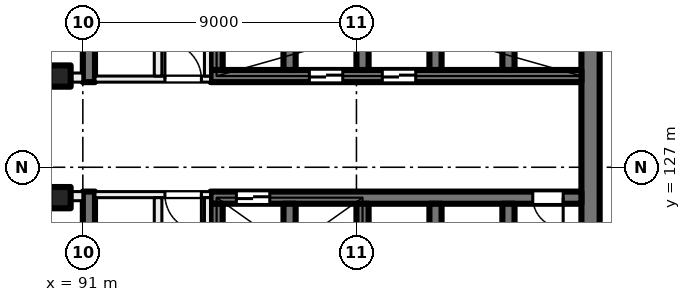
"""IFC4 building model, lengths in metres.
Left out: names, types, materials, properties, quantities, classifications, styles, units other than length and angle.
Written with IfcOpenShell. Run it as: python <this file> out.ifc"""

import sys

from ifc_helpers import new_model, si_unit, direction, frame, frame_2d, origin, origin_2d, place, context, subcontext, project, spatial, rectangle, extrude, element, fill, save


model = new_model("IFC4")
c1 = context("Model", 3, precision=1e-05, world=origin(), true_north=direction((0.0, 1.0)))
c2 = subcontext(c1, "Body", "Model", "MODEL_VIEW")
j1 = project(units=[si_unit("LENGTHUNIT", "METRE"), si_unit("PLANEANGLEUNIT", "RADIAN")], contexts=[c1])
p1 = place(None, origin())
s1 = spatial("IfcSite", under=j1, at=p1, CompositionType="ELEMENT")
p2 = place(p1, origin())
s2 = spatial("IfcBuilding", under=s1, at=p2, CompositionType="ELEMENT")
p3 = place(p2, frame((0.0, 0.0, 47.5)))
s3 = spatial("IfcBuildingStorey", under=s2, at=p3, CompositionType="ELEMENT", Elevation=47.5)
for number, where, z_axis, x_axis in (
    (1, (90.25, 130.0, 0.0), (0.0, 0.0, 1.0), (1.0, 0.0, 0.0)),
    (2, (90.25, 126.0, 0.0), (0.0, 0.0, 1.0), (1.0, 0.0, 0.0)),
):
    element("IfcColumn", number, at=place(p3, frame(where, z_axis=z_axis, x_axis=x_axis)), inside=s3, PredefinedType="COLUMN", context=c2, shape_type="SweptSolid", body=[
        extrude(rectangle(XDim=0.7, YDim=0.7, at=origin_2d()), origin(), (0.0, 0.0, 1.0), 4.0),
    ])
p4 = place(p3, frame((107.7, 135.2, 0.0), z_axis=(0.0, 0.0, 1.0), x_axis=(0.0, -1.0, 0.0)))
e3 = element("IfcWall", 3, at=p4, inside=s3, PredefinedType="SHEAR", context=c2, shape_type="SweptSolid", body=[
    extrude(rectangle(XDim=14.4, YDim=0.6, at=frame_2d((7.2, 0.0))), origin(), (0.0, 0.0, 1.0), 4.0),
])
p5 = place(p3, frame((107.4, 130.0, 0.0), z_axis=(0.0, 0.0, 1.0), x_axis=(-1.0, 0.0, 0.0)))
e4 = element("IfcWall", 4, at=p5, inside=s3, PredefinedType="SHEAR", context=c2, shape_type="SweptSolid", body=[
    extrude(rectangle(XDim=12.2, YDim=0.4, at=frame_2d((6.1, 0.0))), origin(), (0.0, 0.0, 1.0), 4.0),
])
p6 = place(p5, frame((5.45, 0.0, 0.0)))
e5 = element("IfcOpeningElement", 5, at=p6, cuts=e4, PredefinedType="OPENING", context=c2, shape_type="SweptSolid", body=[
    extrude(rectangle(XDim=1.1, YDim=2.1, at=frame_2d((0.55, 1.05))), frame((0.0, 0.21, 0.0), z_axis=(0.0, -1.0, 0.0), x_axis=(1.0, 0.0, 0.0)), (0.0, 0.0, 1.0), 0.42),
])
p7 = place(p5, frame((7.85, 0.0, 0.0)))
e6 = element("IfcOpeningElement", 6, at=p7, cuts=e4, PredefinedType="OPENING", context=c2, shape_type="SweptSolid", body=[
    extrude(rectangle(XDim=1.1, YDim=2.1, at=frame_2d((0.55, 1.05))), frame((0.0, 0.21, 0.0), z_axis=(0.0, -1.0, 0.0), x_axis=(1.0, 0.0, 0.0)), (0.0, 0.0, 1.0), 0.42),
])
for number, where, z_axis, x_axis in (
    (7, (105.0, 133.2, 0.0), (0.0, 0.0, 1.0), (0.0, -1.0, 0.0)),
    (8, (102.6, 133.2, 0.0), (0.0, 0.0, 1.0), (0.0, -1.0, 0.0)),
    (9, (100.2, 133.2, 0.0), (0.0, 0.0, 1.0), (0.0, -1.0, 0.0)),
    (10, (97.8, 133.2, 0.0), (0.0, 0.0, 1.0), (0.0, -1.0, 0.0)),
    (11, (95.4, 133.2, 0.0), (0.0, 0.0, 1.0), (0.0, -1.0, 0.0)),
):
    element("IfcWall", number, at=place(p3, frame(where, z_axis=z_axis, x_axis=x_axis)), inside=s3, PredefinedType="SHEAR", context=c2, shape_type="SweptSolid", body=[
        extrude(rectangle(XDim=3.0, YDim=0.4, at=frame_2d((1.5, 0.0))), origin(), (0.0, 0.0, 1.0), 4.0),
    ])
p8 = place(p3, frame((107.4, 126.0, 0.0), z_axis=(0.0, 0.0, 1.0), x_axis=(-1.0, 0.0, 0.0)))
e12 = element("IfcWall", 12, at=p8, inside=s3, PredefinedType="SHEAR", context=c2, shape_type="SweptSolid", body=[
    extrude(rectangle(XDim=12.2, YDim=0.4, at=frame_2d((6.1, 0.0))), origin(), (0.0, 0.0, 1.0), 4.0),
])
p9 = place(p8, frame((10.25, 0.0, 0.0)))
e13 = element("IfcOpeningElement", 13, at=p9, cuts=e12, PredefinedType="OPENING", context=c2, shape_type="SweptSolid", body=[
    extrude(rectangle(XDim=1.1, YDim=2.1, at=frame_2d((0.55, 1.05))), frame((0.0, 0.21, 0.0), z_axis=(0.0, -1.0, 0.0), x_axis=(1.0, 0.0, 0.0)), (0.0, 0.0, 1.0), 0.42),
])
p10 = place(p8, frame((0.6, 0.0, 0.0)))
e14 = element("IfcOpeningElement", 14, at=p10, cuts=e12, PredefinedType="OPENING", context=c2, shape_type="SweptSolid", body=[
    extrude(rectangle(XDim=1.0, YDim=2.1, at=frame_2d((0.5, 1.05))), frame((0.0, 0.21, 0.0), z_axis=(0.0, -1.0, 0.0), x_axis=(1.0, 0.0, 0.0)), (0.0, 0.0, 1.0), 0.42),
])
for number, where, z_axis, x_axis in (
    (15, (105.0, 125.8, 0.0), (0.0, 0.0, 1.0), (0.0, -1.0, 0.0)),
    (16, (102.6, 125.8, 0.0), (0.0, 0.0, 1.0), (0.0, -1.0, 0.0)),
    (17, (100.2, 125.8, 0.0), (0.0, 0.0, 1.0), (0.0, -1.0, 0.0)),
    (18, (97.8, 125.8, 0.0), (0.0, 0.0, 1.0), (0.0, -1.0, 0.0)),
    (19, (95.4, 125.8, 0.0), (0.0, 0.0, 1.0), (0.0, -1.0, 0.0)),
):
    element("IfcWall", number, at=place(p3, frame(where, z_axis=z_axis, x_axis=x_axis)), inside=s3, PredefinedType="SHEAR", context=c2, shape_type="SweptSolid", body=[
        extrude(rectangle(XDim=3.0, YDim=0.4, at=frame_2d((1.5, 0.0))), origin(), (0.0, 0.0, 1.0), 4.0),
    ])
for number, where, z_axis, x_axis in (
    (20, (91.2, 138.4, 0.0), (0.0, 0.0, 1.0), (0.0, -1.0, 0.0)),
    (21, (91.2, 126.2, 0.0), (0.0, 0.0, 1.0), (0.0, -1.0, 0.0)),
):
    element("IfcWall", number, at=place(p3, frame(where, z_axis=z_axis, x_axis=x_axis)), inside=s3, PredefinedType="SHEAR", context=c2, shape_type="SweptSolid", body=[
        extrude(rectangle(XDim=8.6, YDim=0.4, at=frame_2d((4.3, 0.0))), origin(), (0.0, 0.0, 1.0), 4.0),
    ])
p11 = place(p3, frame((95.2, 126.1, 0.0), z_axis=(0.0, 0.0, 1.0), x_axis=(-1.0, 0.0, 0.0)))
e22 = element("IfcWall", 22, at=p11, inside=s3, PredefinedType="PARTITIONING", context=c2, shape_type="SweptSolid", body=[
    extrude(rectangle(XDim=3.8, YDim=0.2, at=frame_2d((1.9, 0.0))), origin(), (0.0, 0.0, 1.0), 3.625),
])
p12 = place(p11, frame((0.3, 0.0, 0.0)))
e23 = element("IfcOpeningElement", 23, at=p12, cuts=e22, PredefinedType="OPENING", context=c2, shape_type="SweptSolid", body=[
    extrude(rectangle(XDim=1.2, YDim=2.1, at=frame_2d((0.6, 1.05))), frame((0.0, 0.11, 0.0), z_axis=(0.0, -1.0, 0.0), x_axis=(1.0, 0.0, 0.0)), (0.0, 0.0, 1.0), 0.22),
])
p13 = place(p3, frame((95.1, 117.6, 0.0), z_axis=(0.0, 0.0, 1.0), x_axis=(0.0, 1.0, 0.0)))
e24 = element("IfcWall", 24, at=p13, inside=s3, PredefinedType="PARTITIONING", context=c2, shape_type="SweptSolid", body=[
    extrude(rectangle(XDim=8.4, YDim=0.2, at=frame_2d((4.2, 0.0))), origin(), (0.0, 0.0, 1.0), 3.625),
])
p14 = place(p13, frame((1.65, 0.0, 0.0)))
e25 = element("IfcOpeningElement", 25, at=p14, cuts=e24, PredefinedType="OPENING", context=c2, shape_type="SweptSolid", body=[
    extrude(rectangle(XDim=1.5, YDim=2.1, at=frame_2d((0.75, 1.05))), frame((0.0, 0.11, 0.0), z_axis=(0.0, -1.0, 0.0), x_axis=(1.0, 0.0, 0.0)), (0.0, 0.0, 1.0), 0.22),
])
p15 = place(p3, frame((93.475, 117.6, 0.0), z_axis=(0.0, 0.0, 1.0), x_axis=(0.0, 1.0, 0.0)))
e26 = element("IfcWall", 26, at=p15, inside=s3, PredefinedType="PARTITIONING", context=c2, shape_type="SweptSolid", body=[
    extrude(rectangle(XDim=8.4, YDim=0.25, at=frame_2d((4.2, 0.0))), origin(), (0.0, 0.0, 1.0), 3.625),
])
p16 = place(p15, frame((5.225, 0.0, 0.0)))
e27 = element("IfcOpeningElement", 27, at=p16, cuts=e26, PredefinedType="OPENING", context=c2, shape_type="SweptSolid", body=[
    extrude(rectangle(XDim=0.8, YDim=2.1, at=frame_2d((0.4, 1.05))), frame((0.0, 0.135, 0.0), z_axis=(0.0, -1.0, 0.0), x_axis=(1.0, 0.0, 0.0)), (0.0, 0.0, 1.0), 0.27),
])
p17 = place(p15, frame((0.975, 0.0, 0.0)))
e28 = element("IfcOpeningElement", 28, at=p17, cuts=e26, PredefinedType="OPENING", context=c2, shape_type="SweptSolid", body=[
    extrude(rectangle(XDim=0.8, YDim=2.1, at=frame_2d((0.4, 1.05))), frame((0.0, 0.135, 0.0), z_axis=(0.0, -1.0, 0.0), x_axis=(1.0, 0.0, 0.0)), (0.0, 0.0, 1.0), 0.27),
])
p18 = place(p3, frame((91.4, 129.9, 0.0), z_axis=(0.0, 0.0, 1.0), x_axis=(1.0, 0.0, 0.0)))
e29 = element("IfcWall", 29, at=p18, inside=s3, PredefinedType="PARTITIONING", context=c2, shape_type="SweptSolid", body=[
    extrude(rectangle(XDim=3.8, YDim=0.2, at=frame_2d((1.9, 0.0))), origin(), (0.0, 0.0, 1.0), 3.625),
])
p19 = place(p18, frame((2.3, 0.0, 0.0)))
e30 = element("IfcOpeningElement", 30, at=p19, cuts=e29, PredefinedType="OPENING", context=c2, shape_type="SweptSolid", body=[
    extrude(rectangle(XDim=1.2, YDim=2.1, at=frame_2d((0.6, 1.05))), frame((0.0, 0.11, 0.0), z_axis=(0.0, -1.0, 0.0), x_axis=(1.0, 0.0, 0.0)), (0.0, 0.0, 1.0), 0.22),
])
p20 = place(p3, frame((95.1, 130.0, 0.0), z_axis=(0.0, 0.0, 1.0), x_axis=(0.0, 1.0, 0.0)))
e31 = element("IfcWall", 31, at=p20, inside=s3, PredefinedType="PARTITIONING", context=c2, shape_type="SweptSolid", body=[
    extrude(rectangle(XDim=8.4, YDim=0.2, at=frame_2d((4.2, 0.0))), origin(), (0.0, 0.0, 1.0), 3.625),
])
p21 = place(p20, frame((5.25, 0.0, 0.0)))
e32 = element("IfcOpeningElement", 32, at=p21, cuts=e31, PredefinedType="OPENING", context=c2, shape_type="SweptSolid", body=[
    extrude(rectangle(XDim=1.5, YDim=2.1, at=frame_2d((0.75, 1.05))), frame((0.0, 0.11, 0.0), z_axis=(0.0, -1.0, 0.0), x_axis=(1.0, 0.0, 0.0)), (0.0, 0.0, 1.0), 0.22),
])
p22 = place(p3, frame((93.475, 130.0, 0.0), z_axis=(0.0, 0.0, 1.0), x_axis=(0.0, 1.0, 0.0)))
e33 = element("IfcWall", 33, at=p22, inside=s3, PredefinedType="PARTITIONING", context=c2, shape_type="SweptSolid", body=[
    extrude(rectangle(XDim=8.4, YDim=0.25, at=frame_2d((4.2, 0.0))), origin(), (0.0, 0.0, 1.0), 3.625),
])
p23 = place(p22, frame((3.7, 0.0, 0.0)))
e34 = element("IfcOpeningElement", 34, at=p23, cuts=e33, PredefinedType="OPENING", context=c2, shape_type="SweptSolid", body=[
    extrude(rectangle(XDim=1.0, YDim=2.1, at=frame_2d((0.5, 1.05))), frame((0.0, 0.135, 0.0), z_axis=(0.0, -1.0, 0.0), x_axis=(1.0, 0.0, 0.0)), (0.0, 0.0, 1.0), 0.27),
])
p24 = place(p3, frame((72.5, 129.95, 0.0), z_axis=(0.0, 0.0, 1.0), x_axis=(1.0, 0.0, 0.0)))
e35 = element("IfcWall", 35, at=p24, inside=s3, PredefinedType="PARTITIONING", context=c2, shape_type="SweptSolid", body=[
    extrude(rectangle(XDim=18.5, YDim=0.3, at=frame_2d((9.25, 0.0))), origin(), (0.0, 0.0, 1.0), 3.625),
])
p25 = place(p24, frame((14.375, 0.0, 0.0)))
e36 = element("IfcOpeningElement", 36, at=p25, cuts=e35, PredefinedType="OPENING", context=c2, shape_type="SweptSolid", body=[
    extrude(rectangle(XDim=1.0, YDim=2.1, at=frame_2d((0.5, 1.05))), frame((0.0, 0.16, 0.0), z_axis=(0.0, -1.0, 0.0), x_axis=(1.0, 0.0, 0.0)), (0.0, 0.0, 1.0), 0.32),
])
p26 = place(p24, frame((5.9, 0.0, 0.0)))
e37 = element("IfcOpeningElement", 37, at=p26, cuts=e35, PredefinedType="OPENING", context=c2, shape_type="SweptSolid", body=[
    extrude(rectangle(XDim=1.2, YDim=2.1, at=frame_2d((0.6, 1.05))), frame((0.0, 0.16, 0.0), z_axis=(0.0, -1.0, 0.0), x_axis=(1.0, 0.0, 0.0)), (0.0, 0.0, 1.0), 0.32),
])
p27 = place(p24, frame((1.225, 0.0, 0.0)))
e38 = element("IfcOpeningElement", 38, at=p27, cuts=e35, PredefinedType="OPENING", context=c2, shape_type="SweptSolid", body=[
    extrude(rectangle(XDim=1.8, YDim=2.1, at=frame_2d((0.9, 1.05))), frame((0.0, 0.16, 0.0), z_axis=(0.0, -1.0, 0.0), x_axis=(1.0, 0.0, 0.0)), (0.0, 0.0, 1.0), 0.32),
])
p28 = place(p3, frame((91.0, 126.05, 0.0), z_axis=(0.0, 0.0, 1.0), x_axis=(-1.0, 0.0, 0.0)))
e39 = element("IfcWall", 39, at=p28, inside=s3, PredefinedType="PARTITIONING", context=c2, shape_type="SweptSolid", body=[
    extrude(rectangle(XDim=43.785, YDim=0.3, at=frame_2d((21.893, 0.0))), origin(), (0.0, 0.0, 1.0), 3.625),
])
p29 = place(p28, frame((2.125, 0.0, 0.0)))
e40 = element("IfcOpeningElement", 40, at=p29, cuts=e39, PredefinedType="OPENING", context=c2, shape_type="SweptSolid", body=[
    extrude(rectangle(XDim=1.0, YDim=2.1, at=frame_2d((0.5, 1.05))), frame((0.0, 0.16, 0.0), z_axis=(0.0, -1.0, 0.0), x_axis=(1.0, 0.0, 0.0)), (0.0, 0.0, 1.0), 0.32),
])
p30 = place(p28, frame((7.0, 0.0, 0.0)))
e41 = element("IfcOpeningElement", 41, at=p30, cuts=e39, PredefinedType="OPENING", context=c2, shape_type="SweptSolid", body=[
    extrude(rectangle(XDim=1.0, YDim=2.1, at=frame_2d((0.5, 1.05))), frame((0.0, 0.16, 0.0), z_axis=(0.0, -1.0, 0.0), x_axis=(1.0, 0.0, 0.0)), (0.0, 0.0, 1.0), 0.32),
])
p31 = place(p28, frame((11.5, 0.0, 0.0)))
e42 = element("IfcOpeningElement", 42, at=p31, cuts=e39, PredefinedType="OPENING", context=c2, shape_type="SweptSolid", body=[
    extrude(rectangle(XDim=1.0, YDim=2.1, at=frame_2d((0.5, 1.05))), frame((0.0, 0.16, 0.0), z_axis=(0.0, -1.0, 0.0), x_axis=(1.0, 0.0, 0.0)), (0.0, 0.0, 1.0), 0.32),
])
p32 = place(p28, frame((16.0, 0.0, 0.0)))
e43 = element("IfcOpeningElement", 43, at=p32, cuts=e39, PredefinedType="OPENING", context=c2, shape_type="SweptSolid", body=[
    extrude(rectangle(XDim=1.0, YDim=2.1, at=frame_2d((0.5, 1.05))), frame((0.0, 0.16, 0.0), z_axis=(0.0, -1.0, 0.0), x_axis=(1.0, 0.0, 0.0)), (0.0, 0.0, 1.0), 0.32),
])
p33 = place(p28, frame((20.5, 0.0, 0.0)))
e44 = element("IfcOpeningElement", 44, at=p33, cuts=e39, PredefinedType="OPENING", context=c2, shape_type="SweptSolid", body=[
    extrude(rectangle(XDim=1.0, YDim=2.1, at=frame_2d((0.5, 1.05))), frame((0.0, 0.16, 0.0), z_axis=(0.0, -1.0, 0.0), x_axis=(1.0, 0.0, 0.0)), (0.0, 0.0, 1.0), 0.32),
])
p34 = place(p28, frame((31.75, 0.0, 0.0)))
e45 = element("IfcOpeningElement", 45, at=p34, cuts=e39, PredefinedType="OPENING", context=c2, shape_type="SweptSolid", body=[
    extrude(rectangle(XDim=1.0, YDim=2.1, at=frame_2d((0.5, 1.05))), frame((0.0, 0.16, 0.0), z_axis=(0.0, -1.0, 0.0), x_axis=(1.0, 0.0, 0.0)), (0.0, 0.0, 1.0), 0.32),
])
p35 = place(p28, frame((39.296, 0.0, 0.0)))
e46 = element("IfcOpeningElement", 46, at=p35, cuts=e39, PredefinedType="OPENING", context=c2, shape_type="SweptSolid", body=[
    extrude(rectangle(XDim=1.8, YDim=2.1, at=frame_2d((0.9, 1.05))), frame((0.0, 0.16, 0.0), z_axis=(0.0, -1.0, 0.0), x_axis=(1.0, 0.0, 0.0)), (0.0, 0.0, 1.0), 0.32),
])
p36 = place(p9, origin())
e47 = element("IfcDoor", 47, at=p36, inside=s3, OperationType="DOUBLE_DOOR_SLIDING", PredefinedType="DOOR", context=c2, shape_type="SweptSolid", body=[
    extrude(rectangle(XDim=1.1, YDim=2.1, at=frame_2d((0.55, 1.05))), frame((0.0, 0.025, 0.0), z_axis=(0.0, -1.0, 0.0), x_axis=(1.0, 0.0, 0.0)), (0.0, 0.0, 1.0), 0.05),
])
fill(e13, e47)
p37 = place(p6, origin())
e48 = element("IfcDoor", 48, at=p37, inside=s3, OperationType="DOUBLE_DOOR_SLIDING", PredefinedType="DOOR", context=c2, shape_type="SweptSolid", body=[
    extrude(rectangle(XDim=1.1, YDim=2.1, at=frame_2d((0.55, 1.05))), frame((0.0, 0.025, 0.0), z_axis=(0.0, -1.0, 0.0), x_axis=(1.0, 0.0, 0.0)), (0.0, 0.0, 1.0), 0.05),
])
fill(e5, e48)
p38 = place(p7, origin())
e49 = element("IfcDoor", 49, at=p38, inside=s3, OperationType="DOUBLE_DOOR_SLIDING", PredefinedType="DOOR", context=c2, shape_type="SweptSolid", body=[
    extrude(rectangle(XDim=1.1, YDim=2.1, at=frame_2d((0.55, 1.05))), frame((0.0, 0.025, 0.0), z_axis=(0.0, -1.0, 0.0), x_axis=(1.0, 0.0, 0.0)), (0.0, 0.0, 1.0), 0.05),
])
fill(e6, e49)
p39 = place(p10, origin())
e50 = element("IfcDoor", 50, at=p39, inside=s3, OperationType="SINGLE_SWING_LEFT", PredefinedType="DOOR", context=c2, shape_type="SweptSolid", body=[
    extrude(rectangle(XDim=1.0, YDim=2.1, at=frame_2d((0.5, 1.05))), frame((0.0, 0.025, 0.0), z_axis=(0.0, -1.0, 0.0), x_axis=(1.0, 0.0, 0.0)), (0.0, 0.0, 1.0), 0.05),
])
fill(e14, e50)
p40 = place(p12, origin())
e51 = element("IfcDoor", 51, at=p40, inside=s3, OperationType="DOUBLE_DOOR_SINGLE_SWING", PredefinedType="DOOR", context=c2, shape_type="SweptSolid", body=[
    extrude(rectangle(XDim=1.2, YDim=2.1, at=frame_2d((0.6, 1.05))), frame((0.0, 0.025, 0.0), z_axis=(0.0, -1.0, 0.0), x_axis=(1.0, 0.0, 0.0)), (0.0, 0.0, 1.0), 0.05),
])
fill(e23, e51)
p41 = place(p19, origin())
e52 = element("IfcDoor", 52, at=p41, inside=s3, OperationType="DOUBLE_DOOR_SINGLE_SWING", PredefinedType="DOOR", context=c2, shape_type="SweptSolid", body=[
    extrude(rectangle(XDim=1.2, YDim=2.1, at=frame_2d((0.6, 1.05))), frame((0.0, 0.025, 0.0), z_axis=(0.0, -1.0, 0.0), x_axis=(1.0, 0.0, 0.0)), (0.0, 0.0, 1.0), 0.05),
])
fill(e30, e52)
save(model, sys.argv[1])
